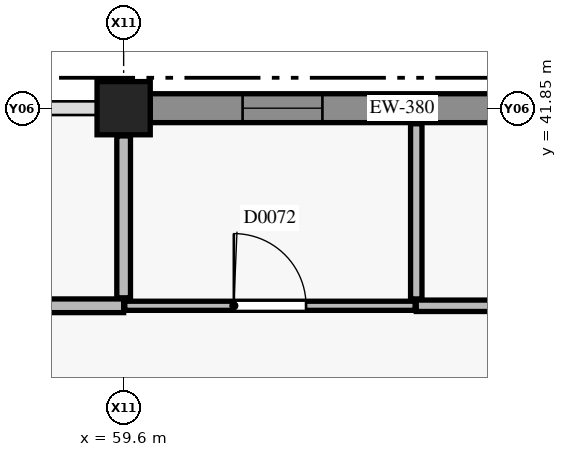
"""IFC4 building model, lengths in metres.
Left out: names, types, materials, properties, quantities, classifications, styles, units other than length and angle.
Written with IfcOpenShell. Run it as: python <this file> out.ifc"""

import sys

from ifc_helpers import new_model, si_unit, direction, frame, frame_2d, origin, origin_2d, place, context, subcontext, project, spatial, rectangle, extrude, element, fill, save


model = new_model("IFC4")
c1 = context("Model", 3, precision=1e-05, world=origin(), true_north=direction((0.0, 1.0)))
c2 = subcontext(c1, "Body", "Model", "MODEL_VIEW")
j1 = project(units=[si_unit("LENGTHUNIT", "METRE"), si_unit("PLANEANGLEUNIT", "RADIAN")], contexts=[c1])
p1 = place(None, origin())
s1 = spatial("IfcSite", under=j1, at=p1, CompositionType="ELEMENT")
p2 = place(p1, origin())
s2 = spatial("IfcBuilding", under=s1, at=p2, CompositionType="ELEMENT")
p3 = place(p2, frame((0.0, 0.0, 4.8)))
s3 = spatial("IfcBuildingStorey", under=s2, at=p3, CompositionType="ELEMENT", Elevation=4.8)
p4 = place(p3, frame((59.6, 41.85, 0.0), z_axis=(0.0, 0.0, 1.0), x_axis=(1.0, 0.0, 0.0)))
e1 = element("IfcColumn", 1, at=p4, inside=s3, PredefinedType="COLUMN", context=c2, shape_type="SweptSolid", body=[
    extrude(rectangle(XDim=0.7, YDim=0.7, at=origin_2d()), origin(), (0.0, 0.0, 1.0), 4.36),
])
p5 = place(p3, frame((59.95, 41.85, 0.0), z_axis=(0.0, 0.0, 1.0), x_axis=(1.0, 0.0, 0.0)))
e2 = element("IfcWall", 2, at=p5, inside=s3, PredefinedType="USERDEFINED", context=c2, shape_type="SweptSolid", body=[
    extrude(rectangle(XDim=6.625, YDim=0.38, at=frame_2d((3.312, 0.0))), origin(), (0.0, 0.0, 1.0), 3.3),
])
p6 = place(p5, frame((1.215, 0.0, 0.9)))
e3 = element("IfcOpeningElement", 3, at=p6, cuts=e2, PredefinedType="OPENING", context=c2, shape_type="SweptSolid", body=[
    extrude(rectangle(XDim=1.05, YDim=1.8, at=frame_2d((0.525, 0.9))), frame((0.0, 0.2, 0.0), z_axis=(0.0, -1.0, 0.0), x_axis=(1.0, 0.0, 0.0)), (0.0, 0.0, 1.0), 0.4),
])
p7 = place(p5, frame((4.472, 0.0, 0.9)))
e4 = element("IfcOpeningElement", 4, at=p7, cuts=e2, PredefinedType="OPENING", context=c2, shape_type="SweptSolid", body=[
    extrude(rectangle(XDim=1.2, YDim=1.8, at=frame_2d((0.6, 0.9))), frame((0.0, 0.2, 0.0), z_axis=(0.0, -1.0, 0.0), x_axis=(1.0, 0.0, 0.0)), (0.0, 0.0, 1.0), 0.4),
])
p8 = place(p3, frame((55.65, 39.25, 0.0), z_axis=(0.0, 0.0, 1.0), x_axis=(1.0, 0.0, 0.0)))
e5 = element("IfcWall", 5, at=p8, inside=s3, PredefinedType="PLUMBINGWALL", context=c2, shape_type="SweptSolid", body=[
    extrude(rectangle(XDim=3.95, YDim=0.18, at=frame_2d((1.975, 0.0))), origin(), (0.0, 0.0, 1.0), 3.95),
])
p9 = place(p8, frame((1.5, 0.0, 0.0)))
e6 = element("IfcOpeningElement", 6, at=p9, cuts=e5, PredefinedType="OPENING", context=c2, shape_type="SweptSolid", body=[
    extrude(rectangle(XDim=0.95, YDim=2.1, at=frame_2d((0.475, 1.05))), frame((0.0, 0.1, 0.0), z_axis=(0.0, -1.0, 0.0), x_axis=(1.0, 0.0, 0.0)), (0.0, 0.0, 1.0), 0.2),
])
p10 = place(p3, frame((63.45, 39.25, 0.0), z_axis=(0.0, 0.0, 1.0), x_axis=(1.0, 0.0, 0.0)))
e7 = element("IfcWall", 7, at=p10, inside=s3, PredefinedType="PARTITIONING", context=c2, shape_type="SweptSolid", body=[
    extrude(rectangle(XDim=3.335, YDim=0.15, at=frame_2d((1.667, 0.0))), origin(), (0.0, 0.0, 1.0), 3.95),
])
p11 = place(p3, frame((59.615, 39.25, 0.0), z_axis=(0.0, 0.0, 1.0), x_axis=(1.0, 0.0, 0.0)))
e8 = element("IfcWall", 8, at=p11, inside=s3, PredefinedType="PARTITIONING", context=c2, shape_type="SweptSolid", body=[
    extrude(rectangle(XDim=3.82, YDim=0.12, at=frame_2d((1.91, 0.0))), origin(), (0.0, 0.0, 1.0), 3.95),
])
p12 = place(p11, frame((1.435, 0.0, 0.0)))
e9 = element("IfcOpeningElement", 9, at=p12, cuts=e8, PredefinedType="OPENING", context=c2, shape_type="SweptSolid", body=[
    extrude(rectangle(XDim=0.95, YDim=2.1, at=frame_2d((0.475, 1.05))), frame((0.0, 0.07, 0.0), z_axis=(0.0, -1.0, 0.0), x_axis=(1.0, 0.0, 0.0)), (0.0, 0.0, 1.0), 0.14),
])
p13 = place(p3, frame((59.6, 39.355, 0.0), z_axis=(0.0, 0.0, 1.0), x_axis=(0.0, 1.0, 0.0)))
e10 = element("IfcWall", 10, at=p13, inside=s3, PredefinedType="PLUMBINGWALL", context=c2, shape_type="SweptSolid", body=[
    extrude(rectangle(XDim=2.13, YDim=0.18, at=frame_2d((1.065, 0.0))), origin(), (0.0, 0.0, 1.0), 3.95),
])
p14 = place(p3, frame((63.45, 39.34, 0.0), z_axis=(0.0, 0.0, 1.0), x_axis=(0.0, 1.0, 0.0)))
e11 = element("IfcWall", 11, at=p14, inside=s3, PredefinedType="PARTITIONING", context=c2, shape_type="SweptSolid", body=[
    extrude(rectangle(XDim=2.305, YDim=0.15, at=frame_2d((1.152, 0.0))), origin(), (0.0, 0.0, 1.0), 3.95),
])
p15 = place(p6, origin())
e12 = element("IfcWindow", 12, at=p15, inside=s3, PartitioningType="SINGLE_PANEL", PredefinedType="WINDOW", context=c2, shape_type="SweptSolid", body=[
    extrude(rectangle(XDim=1.05, YDim=1.8, at=frame_2d((0.525, 0.9))), frame((0.0, 0.03, 0.0), z_axis=(0.0, -1.0, 0.0), x_axis=(1.0, 0.0, 0.0)), (0.0, 0.0, 1.0), 0.06),
])
fill(e3, e12)
p16 = place(p12, origin())
e13 = element("IfcDoor", 13, at=p16, inside=s3, OperationType="SINGLE_SWING_LEFT", PredefinedType="DOOR", context=c2, shape_type="SweptSolid", body=[
    extrude(rectangle(XDim=0.95, YDim=2.1, at=frame_2d((0.475, 1.05))), frame((0.0, 0.025, 0.0), z_axis=(0.0, -1.0, 0.0), x_axis=(1.0, 0.0, 0.0)), (0.0, 0.0, 1.0), 0.05),
])
fill(e9, e13)
save(model, sys.argv[1])
